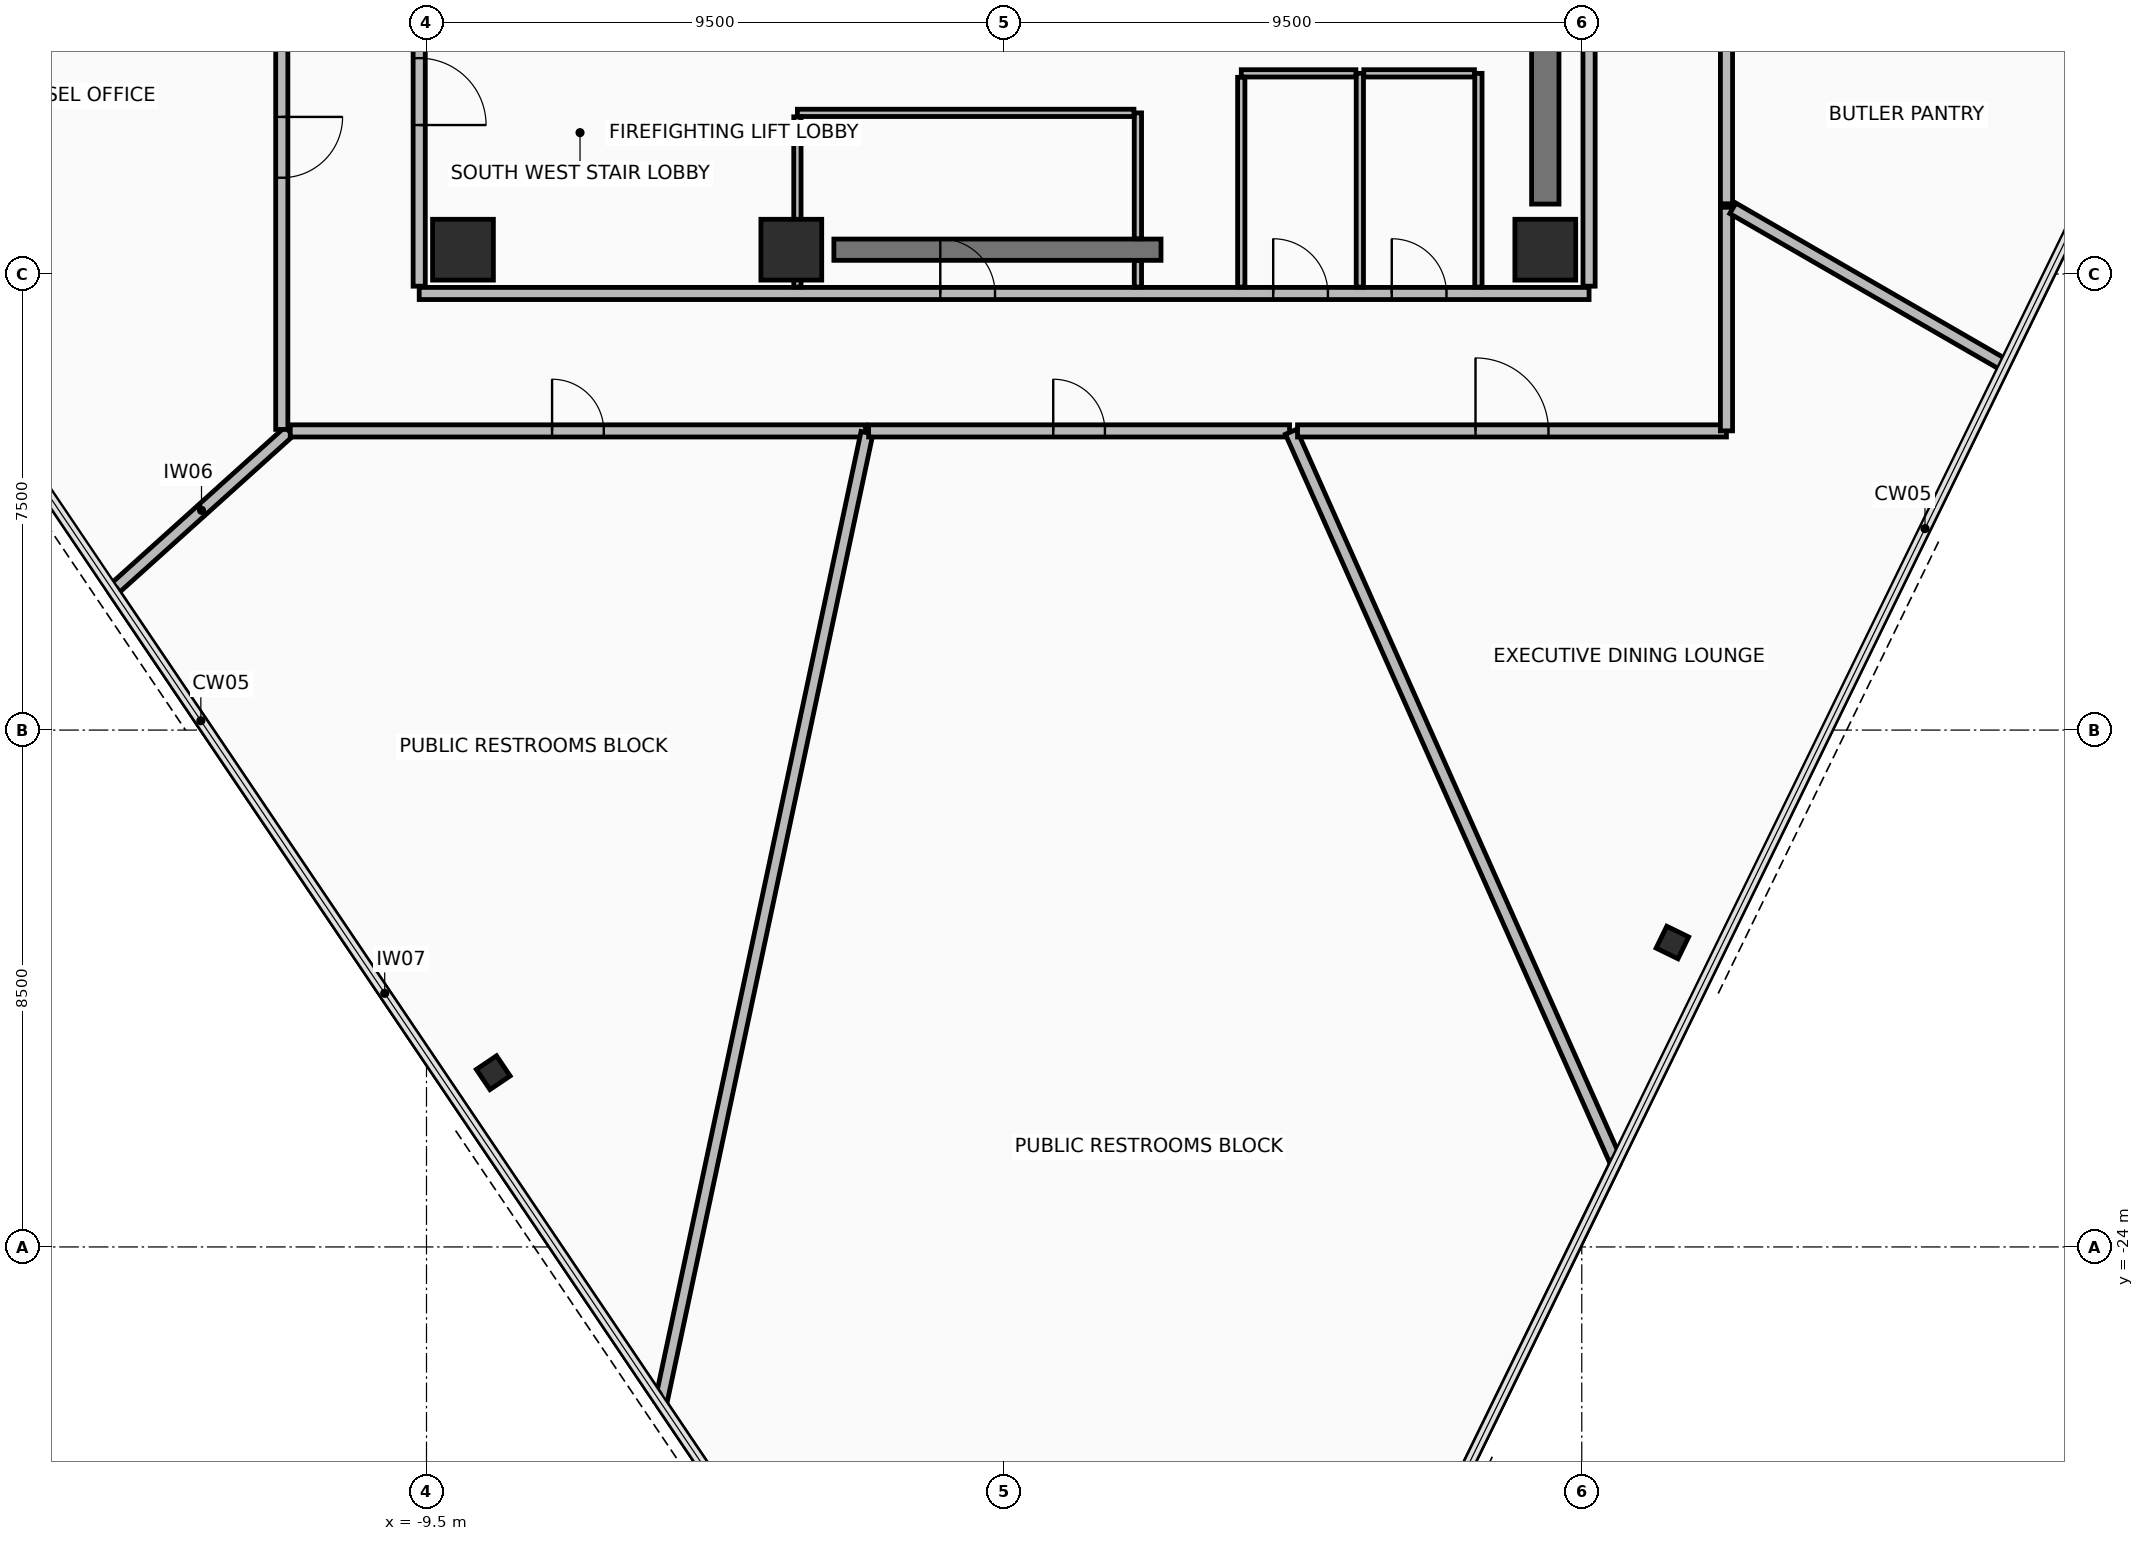
"""IFC4 building model, lengths in metres.
Left out: names, types, materials, properties, quantities, classifications, styles, units other than length and angle.
Written with IfcOpenShell. Run it as: python <this file> out.ifc"""

import sys

from ifc_helpers import new_model, si_unit, direction, frame, frame_2d, origin, origin_2d, place, context, subcontext, project, spatial, rectangle, hollow_rectangle, extrude, element, fill, save


model = new_model("IFC4")
c1 = context("Model", 3, precision=1e-05, world=origin(), true_north=direction((0.0, 1.0)))
c2 = subcontext(c1, "Body", "Model", "MODEL_VIEW")
j1 = project(units=[si_unit("LENGTHUNIT", "METRE"), si_unit("PLANEANGLEUNIT", "RADIAN")], contexts=[c1])
p1 = place(None, origin())
s1 = spatial("IfcSite", under=j1, at=p1, CompositionType="ELEMENT")
p2 = place(p1, origin())
s2 = spatial("IfcBuilding", under=s1, at=p2, CompositionType="ELEMENT")
p3 = place(p2, frame((0.0, 0.0, 253.4)))
s3 = spatial("IfcBuildingStorey", under=s2, at=p3, CompositionType="ELEMENT", Elevation=253.4)
for number, where, z_axis, x_axis in (
    (1, (-8.9, -7.6, 0.0), (0.0, 0.0, 1.0), (1.0, 0.0, 0.0)),
    (2, (-3.5, -7.6, 0.0), (0.0, 0.0, 1.0), (1.0, 0.0, 0.0)),
    (3, (8.9, -7.6, 0.0), (0.0, 0.0, 1.0), (1.0, 0.0, 0.0)),
):
    element("IfcColumn", number, at=place(p3, frame(where, z_axis=z_axis, x_axis=x_axis)), inside=s3, PredefinedType="COLUMN", context=c2, shape_type="SweptSolid", body=[
        extrude(rectangle(XDim=1.0, YDim=1.0, at=origin_2d()), origin(), (0.0, 0.0, 1.0), 3.6),
    ])
p4 = place(p3, frame((-8.402, -21.135, 0.0), z_axis=(0.0, 0.0, 1.0), x_axis=(-0.559192903471, 0.829037572555, 0.0)))
e4 = element("IfcColumn", 4, at=p4, inside=s3, PredefinedType="COLUMN", context=c2, shape_type="SweptSolid", body=[
    extrude(hollow_rectangle(XDim=0.4, YDim=0.4, WallThickness=0.025, at=origin_2d()), origin(), (0.0, 0.0, 1.0), 3.6),
])
p5 = place(p3, frame((10.99, -18.994, -0.19), z_axis=(0.0, 0.0, 1.0), x_axis=(0.43837271548, 0.898793281196, 0.0)))
e5 = element("IfcColumn", 5, at=p5, inside=s3, PredefinedType="COLUMN", context=c2, shape_type="SweptSolid", body=[
    extrude(hollow_rectangle(XDim=0.4, YDim=0.4, WallThickness=0.025, at=origin_2d()), origin(), (0.0, 0.0, 1.0), 3.79),
])
p6 = place(p3, frame((-2.8, -7.6, 0.0), z_axis=(0.0, 0.0, 1.0), x_axis=(1.0, 0.0, 0.0)))
e6 = element("IfcWall", 6, at=p6, inside=s3, PredefinedType="SHEAR", context=c2, shape_type="SweptSolid", body=[
    extrude(rectangle(XDim=5.38, YDim=0.35, at=frame_2d((2.69, 0.0))), origin(), (0.0, 0.0, 1.0), 3.42),
])
p7 = place(p3, frame((8.9, -6.85, 0.0), z_axis=(0.0, 0.0, 1.0), x_axis=(0.0, 1.0, 0.0)))
e7 = element("IfcWall", 7, at=p7, inside=s3, PredefinedType="SHEAR", context=c2, shape_type="SweptSolid", body=[
    extrude(rectangle(XDim=10.7, YDim=0.45, at=frame_2d((5.35, 0.0))), origin(), (0.0, 0.0, 1.0), 3.42),
])
p8 = place(p3, frame((-9.62, -8.32, 0.0), z_axis=(0.0, 0.0, 1.0), x_axis=(1.0, 0.0, 0.0)))
e8 = element("IfcWall", 8, at=p8, inside=s3, PredefinedType="PARTITIONING", context=c2, shape_type="SweptSolid", body=[
    extrude(rectangle(XDim=19.24, YDim=0.2, at=frame_2d((9.62, 0.0))), origin(), (0.0, 0.0, 1.0), 2.915),
])
p9 = place(p8, frame((8.57, 0.0, 0.0)))
e9 = element("IfcOpeningElement", 9, at=p9, cuts=e8, PredefinedType="OPENING", context=c2, shape_type="SweptSolid", body=[
    extrude(rectangle(XDim=0.9, YDim=2.1, at=frame_2d((0.45, 1.05))), frame((0.0, 0.11, 0.0), z_axis=(0.0, -1.0, 0.0), x_axis=(1.0, 0.0, 0.0)), (0.0, 0.0, 1.0), 0.22),
])
p10 = place(p8, frame((14.045, 0.0, 0.0)))
e10 = element("IfcOpeningElement", 10, at=p10, cuts=e8, PredefinedType="OPENING", context=c2, shape_type="SweptSolid", body=[
    extrude(rectangle(XDim=0.9, YDim=2.1, at=frame_2d((0.45, 1.05))), frame((0.0, 0.11, 0.0), z_axis=(0.0, -1.0, 0.0), x_axis=(1.0, 0.0, 0.0)), (0.0, 0.0, 1.0), 0.22),
])
p11 = place(p8, frame((15.995, 0.0, 0.0)))
e11 = element("IfcOpeningElement", 11, at=p11, cuts=e8, PredefinedType="OPENING", context=c2, shape_type="SweptSolid", body=[
    extrude(rectangle(XDim=0.9, YDim=2.1, at=frame_2d((0.45, 1.05))), frame((0.0, 0.11, 0.0), z_axis=(0.0, -1.0, 0.0), x_axis=(1.0, 0.0, 0.0)), (0.0, 0.0, 1.0), 0.22),
])
p12 = place(p3, frame((-9.62, 8.2, 0.0), z_axis=(0.0, 0.0, 1.0), x_axis=(0.0, -1.0, 0.0)))
e12 = element("IfcWall", 12, at=p12, inside=s3, PredefinedType="PARTITIONING", context=c2, shape_type="SweptSolid", body=[
    extrude(rectangle(XDim=16.4, YDim=0.2, at=frame_2d((8.2, 0.0))), origin(), (0.0, 0.0, 1.0), 2.765),
])
p13 = place(p12, frame((12.65, 0.0, 0.0)))
e13 = element("IfcOpeningElement", 13, at=p13, cuts=e12, PredefinedType="OPENING", context=c2, shape_type="SweptSolid", body=[
    extrude(rectangle(XDim=1.1, YDim=2.15, at=frame_2d((0.55, 1.075))), frame((0.0, 0.11, 0.0), z_axis=(0.0, -1.0, 0.0), x_axis=(1.0, 0.0, 0.0)), (0.0, 0.0, 1.0), 0.22),
])
p14 = place(p3, frame((9.62, -8.2, 0.0), z_axis=(0.0, 0.0, 1.0), x_axis=(0.0, 1.0, 0.0)))
e14 = element("IfcWall", 14, at=p14, inside=s3, PredefinedType="PARTITIONING", context=c2, shape_type="SweptSolid", body=[
    extrude(rectangle(XDim=16.4, YDim=0.2, at=frame_2d((8.2, 0.0))), origin(), (0.0, 0.0, 1.0), 2.915),
])
p15 = place(p14, frame((12.65, 0.0, 0.0)))
e15 = element("IfcOpeningElement", 15, at=p15, cuts=e14, PredefinedType="OPENING", context=c2, shape_type="SweptSolid", body=[
    extrude(rectangle(XDim=1.1, YDim=2.15, at=frame_2d((0.55, 1.075))), frame((0.0, 0.11, 0.0), z_axis=(0.0, -1.0, 0.0), x_axis=(1.0, 0.0, 0.0)), (0.0, 0.0, 1.0), 0.22),
])
p16 = place(p3, frame((2.2, -8.215, 0.0), z_axis=(0.0, 0.0, 1.0), x_axis=(0.0, 1.0, 0.0)))
e16 = element("IfcWall", 16, at=p16, inside=s3, PredefinedType="PARTITIONING", context=c2, shape_type="SweptSolid", body=[
    extrude(rectangle(XDim=0.435, YDim=0.12, at=frame_2d((0.218, 0.0))), origin(), (0.0, 0.0, 1.0), 2.715),
])
p17 = place(p3, frame((2.2, -7.42, 0.0), z_axis=(0.0, 0.0, 1.0), x_axis=(0.0, 1.0, 0.0)))
e17 = element("IfcWall", 17, at=p17, inside=s3, PredefinedType="PARTITIONING", context=c2, shape_type="SweptSolid", body=[
    extrude(rectangle(XDim=2.07, YDim=0.12, at=frame_2d((1.035, 0.0))), origin(), (0.0, 0.0, 1.0), 2.715),
])
p18 = place(p3, frame((2.135, -5.35, 0.0), z_axis=(0.0, 0.0, 1.0), x_axis=(-1.0, 0.0, 0.0)))
e18 = element("IfcWall", 18, at=p18, inside=s3, PredefinedType="PARTITIONING", context=c2, shape_type="SweptSolid", body=[
    extrude(rectangle(XDim=5.535, YDim=0.12, at=frame_2d((2.768, 0.0))), origin(), (0.0, 0.0, 1.0), 2.715),
])
p19 = place(p3, frame((-3.4, -5.415, 0.0), z_axis=(0.0, 0.0, 1.0), x_axis=(0.0, -1.0, 0.0)))
e19 = element("IfcWall", 19, at=p19, inside=s3, PredefinedType="PARTITIONING", context=c2, shape_type="SweptSolid", body=[
    extrude(rectangle(XDim=2.8, YDim=0.12, at=frame_2d((1.4, 0.0))), origin(), (0.0, 0.0, 1.0), 2.715),
])
p20 = place(p3, frame((5.85, -8.215, 0.0), z_axis=(0.0, 0.0, 1.0), x_axis=(0.0, 1.0, 0.0)))
e20 = element("IfcWall", 20, at=p20, inside=s3, PredefinedType="PARTITIONING", context=c2, shape_type="SweptSolid", body=[
    extrude(rectangle(XDim=3.515, YDim=0.12, at=frame_2d((1.758, 0.0))), origin(), (0.0, 0.0, 1.0), 2.715),
])
p21 = place(p3, frame((5.785, -4.7, 0.0), z_axis=(0.0, 0.0, 1.0), x_axis=(-1.0, 0.0, 0.0)))
e21 = element("IfcWall", 21, at=p21, inside=s3, PredefinedType="PARTITIONING", context=c2, shape_type="SweptSolid", body=[
    extrude(rectangle(XDim=1.885, YDim=0.12, at=frame_2d((0.942, 0.0))), origin(), (0.0, 0.0, 1.0), 3.42),
])
p22 = place(p3, frame((3.9, -4.765, 0.0), z_axis=(0.0, 0.0, 1.0), x_axis=(0.0, -1.0, 0.0)))
e22 = element("IfcWall", 22, at=p22, inside=s3, PredefinedType="PARTITIONING", context=c2, shape_type="SweptSolid", body=[
    extrude(rectangle(XDim=3.45, YDim=0.12, at=frame_2d((1.725, 0.0))), origin(), (0.0, 0.0, 1.0), 2.715),
])
p23 = place(p3, frame((7.8, -8.215, 0.0), z_axis=(0.0, 0.0, 1.0), x_axis=(0.0, 1.0, 0.0)))
e23 = element("IfcWall", 23, at=p23, inside=s3, PredefinedType="PARTITIONING", context=c2, shape_type="SweptSolid", body=[
    extrude(rectangle(XDim=3.515, YDim=0.12, at=frame_2d((1.758, 0.0))), origin(), (0.0, 0.0, 1.0), 2.715),
])
p24 = place(p3, frame((7.735, -4.7, 0.0), z_axis=(0.0, 0.0, 1.0), x_axis=(-1.0, 0.0, 0.0)))
e24 = element("IfcWall", 24, at=p24, inside=s3, PredefinedType="PARTITIONING", context=c2, shape_type="SweptSolid", body=[
    extrude(rectangle(XDim=1.82, YDim=0.12, at=frame_2d((0.91, 0.0))), origin(), (0.0, 0.0, 1.0), 3.42),
])
p25 = place(p3, frame((-14.643, -13.185, 0.0), z_axis=(0.0, 0.0, 1.0), x_axis=(0.74316596467, 0.669107128161, 0.0)))
e25 = element("IfcWall", 25, at=p25, inside=s3, PredefinedType="PARTITIONING", context=c2, shape_type="SweptSolid", body=[
    extrude(rectangle(XDim=3.883, YDim=0.2, at=frame_2d((1.942, 0.0))), origin(), (0.0, 0.0, 1.0), 2.765),
])
p26 = place(p3, frame((-11.741, -10.58, 0.0), z_axis=(0.0, 0.0, 1.0), x_axis=(1.0, 0.0, 0.0)))
e26 = element("IfcWall", 26, at=p26, inside=s3, PredefinedType="PARTITIONING", context=c2, shape_type="SweptSolid", body=[
    extrude(rectangle(XDim=9.461, YDim=0.2, at=frame_2d((4.73, 0.0))), origin(), (0.0, 0.0, 1.0), 2.915),
])
p27 = place(p26, frame((4.306, 0.0, 0.0)))
e27 = element("IfcOpeningElement", 27, at=p27, cuts=e26, PredefinedType="OPENING", context=c2, shape_type="SweptSolid", body=[
    extrude(rectangle(XDim=0.85, YDim=2.1, at=frame_2d((0.425, 1.05))), frame((0.0, 0.11, 0.0), z_axis=(0.0, -1.0, 0.0), x_axis=(1.0, 0.0, 0.0)), (0.0, 0.0, 1.0), 0.22),
])
p28 = place(p3, frame((-2.255, -10.61, 0.0), z_axis=(0.0, 0.0, 1.0), x_axis=(-0.207902262157, -0.97814960481, 0.0)))
e28 = element("IfcWall", 28, at=p28, inside=s3, PredefinedType="PARTITIONING", context=c2, shape_type="SweptSolid", body=[
    extrude(rectangle(XDim=16.309, YDim=0.2, at=frame_2d((8.154, 0.0))), origin(), (0.0, 0.0, 1.0), 2.765),
])
p29 = place(p3, frame((-5.728, -26.441, 0.0), z_axis=(0.0, 0.0, 1.0), x_axis=(-0.559188397691, 0.829040611724, 0.0)))
e29 = element("IfcWall", 29, at=p29, inside=s3, PredefinedType="PARTITIONING", context=c2, shape_type="SweptSolid", body=[
    extrude(rectangle(XDim=15.951, YDim=0.15, at=frame_2d((7.976, 0.0))), origin(), (0.0, 0.0, 1.0), 3.42),
])
p30 = place(p3, frame((-0.024, -34.897, 0.0), z_axis=(0.0, 0.0, 1.0), x_axis=(-0.559196847428, 0.829034912309, 0.0)))
e30 = element("IfcWall", 30, at=p30, inside=s3, PredefinedType="PARTITIONING", context=c2, shape_type="SweptSolid", body=[
    extrude(rectangle(XDim=10.043, YDim=0.15, at=frame_2d((5.021, 0.0))), origin(), (0.0, 0.0, 1.0), 3.42),
])
p31 = place(p3, frame((-2.229, -10.58, 0.0), z_axis=(0.0, 0.0, 1.0), x_axis=(1.0, 0.0, 0.0)))
e31 = element("IfcWall", 31, at=p31, inside=s3, PredefinedType="PARTITIONING", context=c2, shape_type="SweptSolid", body=[
    extrude(rectangle(XDim=6.923, YDim=0.2, at=frame_2d((3.461, 0.0))), origin(), (0.0, 0.0, 1.0), 3.42),
])
p32 = place(p31, frame((3.036, 0.0, 0.0)))
e32 = element("IfcOpeningElement", 32, at=p32, cuts=e31, PredefinedType="OPENING", context=c2, shape_type="SweptSolid", body=[
    extrude(rectangle(XDim=0.85, YDim=2.1, at=frame_2d((0.425, 1.05))), frame((0.0, 0.11, 0.0), z_axis=(0.0, -1.0, 0.0), x_axis=(1.0, 0.0, 0.0)), (0.0, 0.0, 1.0), 0.22),
])
p33 = place(p3, frame((4.717, -10.595, 0.0), z_axis=(0.0, 0.0, 1.0), x_axis=(0.406740308305, -0.913543825769, 0.0)))
e33 = element("IfcWall", 33, at=p33, inside=s3, PredefinedType="PARTITIONING", context=c2, shape_type="SweptSolid", body=[
    extrude(rectangle(XDim=13.134, YDim=0.2, at=frame_2d((6.567, 0.0))), origin(), (0.0, 0.0, 1.0), 2.765),
])
p34 = place(p3, frame((10.059, -22.614, 0.0), z_axis=(0.0, 0.0, 1.0), x_axis=(-0.438368087018, -0.898795538643, 0.0)))
e34 = element("IfcWall", 34, at=p34, inside=s3, PredefinedType="PARTITIONING", context=c2, shape_type="SweptSolid", body=[
    extrude(rectangle(XDim=13.336, YDim=0.15, at=frame_2d((6.668, 0.0))), origin(), (0.0, 0.0, 1.0), 3.42),
])
p35 = place(p3, frame((-11.88, -1.276, 0.0), z_axis=(0.0, 0.0, 1.0), x_axis=(0.0, -1.0, 0.0)))
e35 = element("IfcWall", 35, at=p35, inside=s3, PredefinedType="PARTITIONING", context=c2, shape_type="SweptSolid", body=[
    extrude(rectangle(XDim=9.279, YDim=0.2, at=frame_2d((4.64, 0.0))), origin(), (0.0, 0.0, 1.0), 2.915),
])
p36 = place(p35, frame((4.14, 0.0, 0.0)))
e36 = element("IfcOpeningElement", 36, at=p36, cuts=e35, PredefinedType="OPENING", context=c2, shape_type="SweptSolid", body=[
    extrude(rectangle(XDim=1.0, YDim=2.15, at=frame_2d((0.5, 1.075))), frame((0.0, 0.11, 0.0), z_axis=(0.0, -1.0, 0.0), x_axis=(1.0, 0.0, 0.0)), (0.0, 0.0, 1.0), 0.22),
])
p37 = place(p3, frame((4.825, -10.58, 0.0), z_axis=(0.0, 0.0, 1.0), x_axis=(1.0, 0.0, 0.0)))
e37 = element("IfcWall", 37, at=p37, inside=s3, PredefinedType="PARTITIONING", context=c2, shape_type="SweptSolid", body=[
    extrude(rectangle(XDim=7.054, YDim=0.2, at=frame_2d((3.527, 0.0))), origin(), (0.0, 0.0, 1.0), 2.915),
])
p38 = place(p37, frame((2.927, 0.0, 0.0)))
e38 = element("IfcOpeningElement", 38, at=p38, cuts=e37, PredefinedType="OPENING", context=c2, shape_type="SweptSolid", body=[
    extrude(rectangle(XDim=1.2, YDim=2.15, at=frame_2d((0.6, 1.075))), frame((0.0, 0.11, 0.0), z_axis=(0.0, -1.0, 0.0), x_axis=(1.0, 0.0, 0.0)), (0.0, 0.0, 1.0), 0.22),
])
p39 = place(p3, frame((11.88, -10.579, 0.0), z_axis=(0.0, 0.0, 1.0), x_axis=(0.0, 1.0, 0.0)))
e39 = element("IfcWall", 39, at=p39, inside=s3, PredefinedType="PARTITIONING", context=c2, shape_type="SweptSolid", body=[
    extrude(rectangle(XDim=3.677, YDim=0.2, at=frame_2d((1.839, 0.0))), origin(), (0.0, 0.0, 1.0), 3.115),
])
p40 = place(p3, frame((11.985, -6.92, 0.0), z_axis=(0.0, 0.0, 1.0), x_axis=(0.866041575714, -0.49997198835, 0.0)))
e40 = element("IfcWall", 40, at=p40, inside=s3, PredefinedType="PARTITIONING", context=c2, shape_type="SweptSolid", body=[
    extrude(rectangle(XDim=5.138, YDim=0.2, at=frame_2d((2.569, 0.0))), origin(), (0.0, 0.0, 1.0), 2.765),
])
p41 = place(p3, frame((11.88, -6.844, 0.0), z_axis=(0.0, 0.0, 1.0), x_axis=(0.0, 1.0, 0.0)))
e41 = element("IfcWall", 41, at=p41, inside=s3, PredefinedType="PARTITIONING", context=c2, shape_type="SweptSolid", body=[
    extrude(rectangle(XDim=4.719, YDim=0.2, at=frame_2d((2.36, 0.0))), origin(), (0.0, 0.0, 1.0), 2.915),
])
p42 = place(p13, frame((1.1, 0.0, 0.0), z_axis=(0.0, 0.0, 1.0), x_axis=(-1.0, 0.0, 0.0)))
e42 = element("IfcDoor", 42, at=p42, inside=s3, OperationType="SINGLE_SWING_LEFT", PredefinedType="DOOR", context=c2, shape_type="SweptSolid", body=[
    extrude(rectangle(XDim=1.1, YDim=2.15, at=frame_2d((0.55, 1.075))), frame((0.0, 0.025, 0.0), z_axis=(0.0, -1.0, 0.0), x_axis=(1.0, 0.0, 0.0)), (0.0, 0.0, 1.0), 0.05),
])
fill(e13, e42)
p43 = place(p9, origin())
e43 = element("IfcDoor", 43, at=p43, inside=s3, OperationType="SINGLE_SWING_LEFT", PredefinedType="DOOR", context=c2, shape_type="SweptSolid", body=[
    extrude(rectangle(XDim=0.9, YDim=2.1, at=frame_2d((0.45, 1.05))), frame((0.0, 0.025, 0.0), z_axis=(0.0, -1.0, 0.0), x_axis=(1.0, 0.0, 0.0)), (0.0, 0.0, 1.0), 0.05),
])
fill(e9, e43)
p44 = place(p10, origin())
e44 = element("IfcDoor", 44, at=p44, inside=s3, OperationType="SINGLE_SWING_LEFT", PredefinedType="DOOR", context=c2, shape_type="SweptSolid", body=[
    extrude(rectangle(XDim=0.9, YDim=2.1, at=frame_2d((0.45, 1.05))), frame((0.0, 0.025, 0.0), z_axis=(0.0, -1.0, 0.0), x_axis=(1.0, 0.0, 0.0)), (0.0, 0.0, 1.0), 0.05),
])
fill(e10, e44)
p45 = place(p11, origin())
e45 = element("IfcDoor", 45, at=p45, inside=s3, OperationType="SINGLE_SWING_LEFT", PredefinedType="DOOR", context=c2, shape_type="SweptSolid", body=[
    extrude(rectangle(XDim=0.9, YDim=2.1, at=frame_2d((0.45, 1.05))), frame((0.0, 0.025, 0.0), z_axis=(0.0, -1.0, 0.0), x_axis=(1.0, 0.0, 0.0)), (0.0, 0.0, 1.0), 0.05),
])
fill(e11, e45)
p46 = place(p27, origin())
e46 = element("IfcDoor", 46, at=p46, inside=s3, OperationType="SINGLE_SWING_RIGHT", PredefinedType="DOOR", context=c2, shape_type="SweptSolid", body=[
    extrude(rectangle(XDim=0.85, YDim=2.1, at=frame_2d((0.425, 1.05))), frame((0.0, 0.025, 0.0), z_axis=(0.0, -1.0, 0.0), x_axis=(1.0, 0.0, 0.0)), (0.0, 0.0, 1.0), 0.05),
])
fill(e27, e46)
p47 = place(p32, origin())
e47 = element("IfcDoor", 47, at=p47, inside=s3, OperationType="SINGLE_SWING_RIGHT", PredefinedType="DOOR", context=c2, shape_type="SweptSolid", body=[
    extrude(rectangle(XDim=0.85, YDim=2.1, at=frame_2d((0.425, 1.05))), frame((0.0, 0.025, 0.0), z_axis=(0.0, -1.0, 0.0), x_axis=(1.0, 0.0, 0.0)), (0.0, 0.0, 1.0), 0.05),
])
fill(e32, e47)
p48 = place(p36, origin())
e48 = element("IfcDoor", 48, at=p48, inside=s3, OperationType="SINGLE_SWING_RIGHT", PredefinedType="DOOR", context=c2, shape_type="SweptSolid", body=[
    extrude(rectangle(XDim=1.0, YDim=2.15, at=frame_2d((0.5, 1.075))), frame((0.0, 0.025, 0.0), z_axis=(0.0, -1.0, 0.0), x_axis=(1.0, 0.0, 0.0)), (0.0, 0.0, 1.0), 0.05),
])
fill(e36, e48)
p49 = place(p38, origin())
e49 = element("IfcDoor", 49, at=p49, inside=s3, OperationType="SINGLE_SWING_LEFT", PredefinedType="DOOR", context=c2, shape_type="SweptSolid", body=[
    extrude(rectangle(XDim=1.2, YDim=2.15, at=frame_2d((0.6, 1.075))), frame((0.0, 0.025, 0.0), z_axis=(0.0, -1.0, 0.0), x_axis=(1.0, 0.0, 0.0)), (0.0, 0.0, 1.0), 0.05),
])
fill(e38, e49)
save(model, sys.argv[1])
